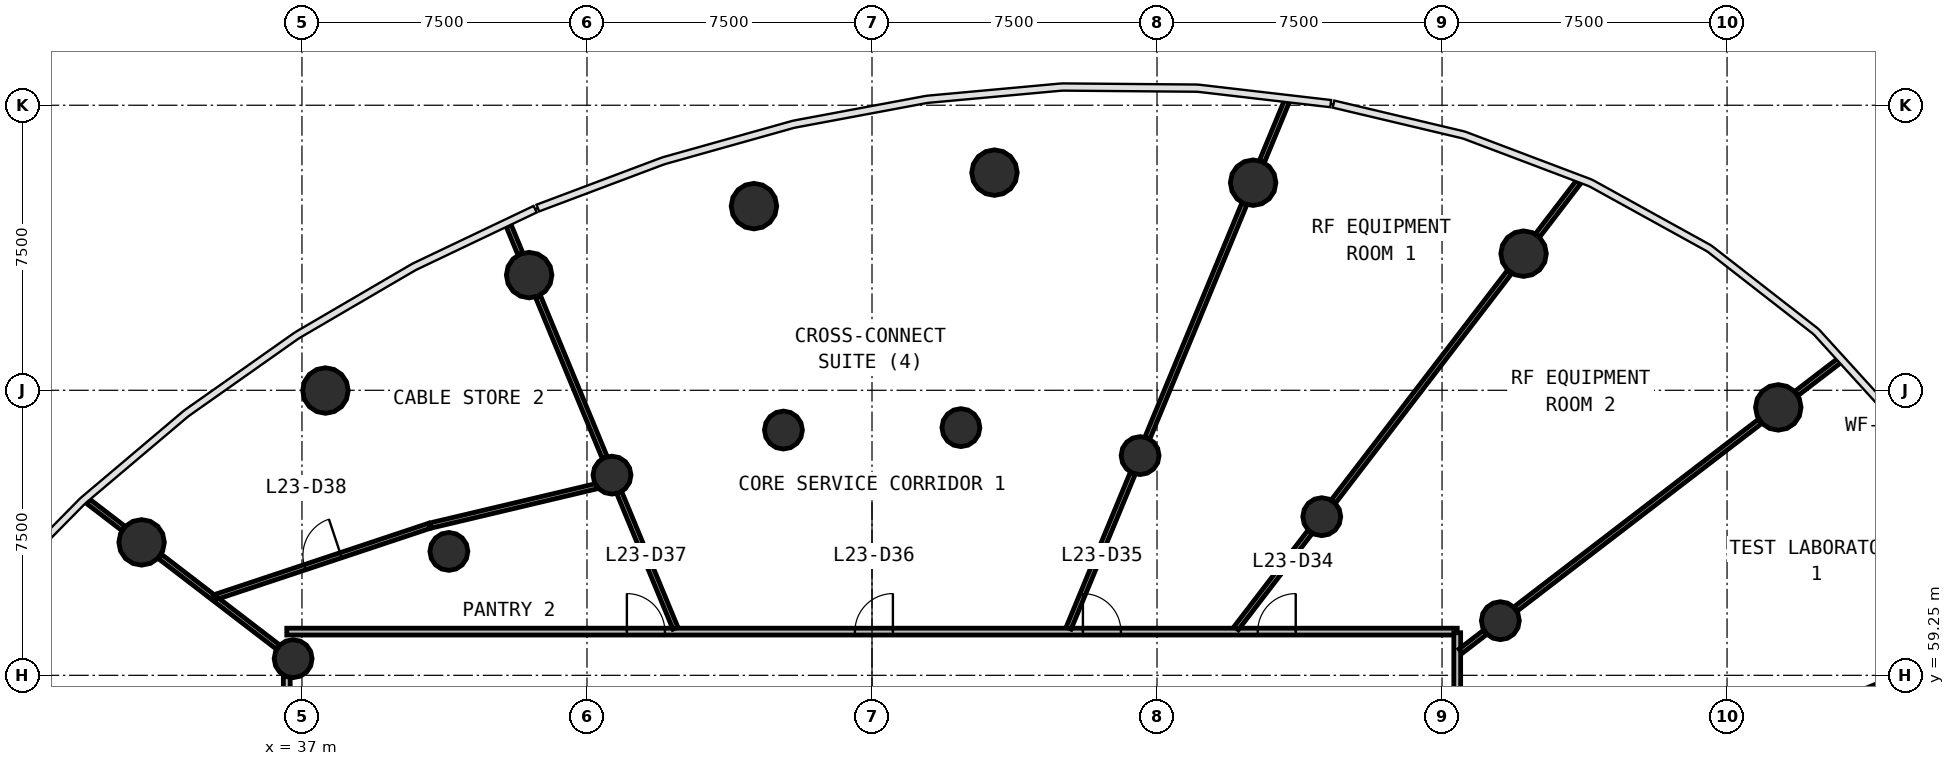
"""IFC4 building model, lengths in metres.
Left out: names, types, materials, properties, quantities, classifications, styles, units other than length and angle.
Written with IfcOpenShell. Run it as: python <this file> out.ifc"""

import sys

from ifc_helpers import new_model, si_unit, direction, frame, frame_2d, origin, origin_2d, place, context, subcontext, project, spatial, rectangle, circle, extrude, source, transform, mapped, element, fill, save


model = new_model("IFC4")
c1 = context("Model", 3, precision=1e-05, world=origin(), true_north=direction((0.0, 1.0)))
c2 = subcontext(c1, "Body", "Model", "MODEL_VIEW")
j1 = project(units=[si_unit("LENGTHUNIT", "METRE"), si_unit("PLANEANGLEUNIT", "RADIAN")], contexts=[c1])
p1 = place(None, origin())
s1 = spatial("IfcSite", under=j1, at=p1, CompositionType="ELEMENT")
p2 = place(p1, origin())
s2 = spatial("IfcBuilding", under=s1, at=p2, CompositionType="ELEMENT")
p3 = place(p2, frame((0.0, 0.0, 100.3)))
s3 = spatial("IfcBuildingStorey", under=s2, at=p3, CompositionType="ELEMENT", Elevation=100.3)
m1 = source(origin(), c2, "Body", "SweptSolid", [
    extrude(circle(Radius=0.6, at=origin_2d()), origin(), (0.0, 0.0, 1.0), 4.1),
])
for number, where, z_axis, x_axis in (
    (1, (75.848, 66.299, 0.0), (0.0, 0.0, 1.0), (1.0, 0.0, 0.0)),
    (2, (69.146, 70.345, 0.0), (0.0, 0.0, 1.0), (1.0, 0.0, 0.0)),
    (3, (62.029, 72.212, 0.0), (0.0, 0.0, 1.0), (1.0, 0.0, 0.0)),
    (4, (55.222, 72.477, 0.0), (0.0, 0.0, 1.0), (1.0, 0.0, 0.0)),
    (5, (48.894, 71.595, 0.0), (0.0, 0.0, 1.0), (1.0, 0.0, 0.0)),
    (6, (42.978, 69.781, 0.0), (0.0, 0.0, 1.0), (1.0, 0.0, 0.0)),
    (7, (37.618, 66.743, 0.0), (0.0, 0.0, 1.0), (1.0, 0.0, 0.0)),
    (8, (32.78, 62.748, 0.0), (0.0, 0.0, 1.0), (1.0, 0.0, 0.0)),
):
    element("IfcColumn", number, at=place(p3, frame(where, z_axis=z_axis, x_axis=x_axis)), inside=s3, PredefinedType="COLUMN", context=c2, shape_type="MappedRepresentation", body=[
        mapped(m1, transform((0.0, 0.0, 0.0), scale=1.0)),
    ])
m2 = source(origin(), c2, "Body", "SweptSolid", [
    extrude(circle(Radius=0.5, at=origin_2d()), origin(), (0.0, 0.0, 1.0), 4.1),
])
for number, where, z_axis, x_axis in (
    (9, (68.535, 60.688, 0.0), (0.0, 0.0, 1.0), (1.0, 0.0, 0.0)),
    (10, (63.835, 63.424, 0.0), (0.0, 0.0, 1.0), (1.0, 0.0, 0.0)),
    (11, (59.055, 65.031, 0.0), (0.0, 0.0, 1.0), (1.0, 0.0, 0.0)),
    (12, (54.339, 65.767, 0.0), (0.0, 0.0, 1.0), (1.0, 0.0, 0.0)),
    (13, (49.669, 65.703, 0.0), (0.0, 0.0, 1.0), (1.0, 0.0, 0.0)),
    (14, (45.158, 64.518, 0.0), (0.0, 0.0, 1.0), (1.0, 0.0, 0.0)),
    (15, (40.866, 62.51, 0.0), (0.0, 0.0, 1.0), (1.0, 0.0, 0.0)),
    (16, (36.768, 59.688, 0.0), (0.0, 0.0, 1.0), (1.0, 0.0, 0.0)),
):
    element("IfcColumn", number, at=place(p3, frame(where, z_axis=z_axis, x_axis=x_axis)), inside=s3, PredefinedType="COLUMN", context=c2, shape_type="MappedRepresentation", body=[
        mapped(m2, transform((0.0, 0.0, 0.0), scale=1.0)),
    ])
p4 = place(p3, frame((36.6, 60.4, 0.0), z_axis=(0.0, 0.0, 1.0), x_axis=(1.0, 0.0, 0.0)))
e17 = element("IfcWall", 17, at=p4, inside=s3, PredefinedType="PARTITIONING", context=c2, shape_type="SweptSolid", body=[
    extrude(rectangle(XDim=30.8, YDim=0.18, at=frame_2d((15.4, 0.0))), origin(), (0.0, 0.0, 1.0), 2.9),
])
p5 = place(p4, frame((25.55, 0.0, 0.0)))
e18 = element("IfcOpeningElement", 18, at=p5, cuts=e17, PredefinedType="OPENING", context=c2, shape_type="SweptSolid", body=[
    extrude(rectangle(XDim=1.0, YDim=2.1, at=frame_2d((0.5, 1.05))), frame((0.0, 0.1, 0.0), z_axis=(0.0, -1.0, 0.0), x_axis=(1.0, 0.0, 0.0)), (0.0, 0.0, 1.0), 0.2),
])
p6 = place(p4, frame((20.95, 0.0, 0.0)))
e19 = element("IfcOpeningElement", 19, at=p6, cuts=e17, PredefinedType="OPENING", context=c2, shape_type="SweptSolid", body=[
    extrude(rectangle(XDim=1.0, YDim=2.1, at=frame_2d((0.5, 1.05))), frame((0.0, 0.1, 0.0), z_axis=(0.0, -1.0, 0.0), x_axis=(1.0, 0.0, 0.0)), (0.0, 0.0, 1.0), 0.2),
])
p7 = place(p4, frame((14.95, 0.0, 0.0)))
e20 = element("IfcOpeningElement", 20, at=p7, cuts=e17, PredefinedType="OPENING", context=c2, shape_type="SweptSolid", body=[
    extrude(rectangle(XDim=1.0, YDim=2.1, at=frame_2d((0.5, 1.05))), frame((0.0, 0.1, 0.0), z_axis=(0.0, -1.0, 0.0), x_axis=(1.0, 0.0, 0.0)), (0.0, 0.0, 1.0), 0.2),
])
p8 = place(p4, frame((8.95, 0.0, 0.0)))
e21 = element("IfcOpeningElement", 21, at=p8, cuts=e17, PredefinedType="OPENING", context=c2, shape_type="SweptSolid", body=[
    extrude(rectangle(XDim=1.0, YDim=2.1, at=frame_2d((0.5, 1.05))), frame((0.0, 0.1, 0.0), z_axis=(0.0, -1.0, 0.0), x_axis=(1.0, 0.0, 0.0)), (0.0, 0.0, 1.0), 0.2),
])
p9 = place(p3, frame((67.4, 60.37, 0.0), z_axis=(0.0, 0.0, 1.0), x_axis=(0.0, -1.0, 0.0)))
e22 = element("IfcWall", 22, at=p9, inside=s3, PredefinedType="PARTITIONING", context=c2, shape_type="SweptSolid", body=[
    extrude(rectangle(XDim=23.583, YDim=0.18, at=frame_2d((11.791, 0.0))), origin(), (0.0, 0.0, 1.0), 2.9),
])
p10 = place(p9, frame((14.732, 0.0, 0.0)))
e23 = element("IfcOpeningElement", 23, at=p10, cuts=e22, PredefinedType="OPENING", context=c2, shape_type="SweptSolid", body=[
    extrude(rectangle(XDim=1.0, YDim=2.1, at=frame_2d((0.5, 1.05))), frame((0.0, 0.1, 0.0), z_axis=(0.0, -1.0, 0.0), x_axis=(1.0, 0.0, 0.0)), (0.0, 0.0, 1.0), 0.2),
])
p11 = place(p9, frame((11.333, 0.0, 0.0)))
e24 = element("IfcOpeningElement", 24, at=p11, cuts=e22, PredefinedType="OPENING", context=c2, shape_type="SweptSolid", body=[
    extrude(rectangle(XDim=1.0, YDim=2.1, at=frame_2d((0.5, 1.05))), frame((0.0, 0.1, 0.0), z_axis=(0.0, -1.0, 0.0), x_axis=(1.0, 0.0, 0.0)), (0.0, 0.0, 1.0), 0.2),
])
p12 = place(p9, frame((4.532, 0.0, 0.0)))
e25 = element("IfcOpeningElement", 25, at=p12, cuts=e22, PredefinedType="OPENING", context=c2, shape_type="SweptSolid", body=[
    extrude(rectangle(XDim=1.0, YDim=2.1, at=frame_2d((0.5, 1.05))), frame((0.0, 0.1, 0.0), z_axis=(0.0, -1.0, 0.0), x_axis=(1.0, 0.0, 0.0)), (0.0, 0.0, 1.0), 0.2),
])
p13 = place(p3, frame((36.6, 35.63, 0.0), z_axis=(0.0, 0.0, 1.0), x_axis=(0.0, 1.0, 0.0)))
e26 = element("IfcWall", 26, at=p13, inside=s3, PredefinedType="PARTITIONING", context=c2, shape_type="SweptSolid", body=[
    extrude(rectangle(XDim=23.583, YDim=0.18, at=frame_2d((11.791, 0.0))), origin(), (0.0, 0.0, 1.0), 2.9),
])
p14 = place(p13, frame((11.333, 0.0, 0.0)))
e27 = element("IfcOpeningElement", 27, at=p14, cuts=e26, PredefinedType="OPENING", context=c2, shape_type="SweptSolid", body=[
    extrude(rectangle(XDim=1.0, YDim=2.1, at=frame_2d((0.5, 1.05))), frame((0.0, 0.1, 0.0), z_axis=(0.0, -1.0, 0.0), x_axis=(1.0, 0.0, 0.0)), (0.0, 0.0, 1.0), 0.2),
])
p15 = place(p13, frame((9.133, 0.0, 0.0)))
e28 = element("IfcOpeningElement", 28, at=p15, cuts=e26, PredefinedType="OPENING", context=c2, shape_type="SweptSolid", body=[
    extrude(rectangle(XDim=1.0, YDim=2.1, at=frame_2d((0.5, 1.05))), frame((0.0, 0.1, 0.0), z_axis=(0.0, -1.0, 0.0), x_axis=(1.0, 0.0, 0.0)), (0.0, 0.0, 1.0), 0.2),
])
p16 = place(p3, frame((68.935, 60.995, 0.0), z_axis=(0.0, 0.0, 1.0), x_axis=(0.793358692504, 0.608754453805, 0.0)))
e29 = element("IfcWall", 29, at=p16, inside=s3, PredefinedType="PARTITIONING", context=c2, shape_type="SweptSolid", body=[
    extrude(rectangle(XDim=8.11, YDim=0.14, at=frame_2d((4.055, 0.0))), origin(), (0.0, 0.0, 1.0), 2.9),
])
p17 = place(p3, frame((64.142, 63.824, 0.0), z_axis=(0.0, 0.0, 1.0), x_axis=(0.608755907151, 0.793357577331, 0.0)))
e30 = element("IfcWall", 30, at=p17, inside=s3, PredefinedType="PARTITIONING", context=c2, shape_type="SweptSolid", body=[
    extrude(rectangle(XDim=7.615, YDim=0.14, at=frame_2d((3.808, 0.0))), origin(), (0.0, 0.0, 1.0), 2.9),
])
p18 = place(p3, frame((59.248, 65.498, 0.0), z_axis=(0.0, 0.0, 1.0), x_axis=(0.382696989205, 0.923873916968, 0.0)))
e31 = element("IfcWall", 31, at=p18, inside=s3, PredefinedType="PARTITIONING", context=c2, shape_type="SweptSolid", body=[
    extrude(rectangle(XDim=6.663, YDim=0.14, at=frame_2d((3.332, 0.0))), origin(), (0.0, 0.0, 1.0), 2.9),
])
p19 = place(p3, frame((34.675, 61.294, 0.0), z_axis=(0.0, 0.0, 1.0), x_axis=(0.948817917671, 0.315823620247, 0.0)))
e32 = element("IfcWall", 32, at=p19, inside=s3, PredefinedType="PARTITIONING", context=c2, shape_type="SweptSolid", body=[
    extrude(rectangle(XDim=5.981, YDim=0.14, at=frame_2d((2.99, 0.0))), origin(), (0.0, 0.0, 1.0), 2.9),
])
p20 = place(p19, frame((2.531, 0.0, 0.0)))
e33 = element("IfcOpeningElement", 33, at=p20, cuts=e32, PredefinedType="OPENING", context=c2, shape_type="SweptSolid", body=[
    extrude(rectangle(XDim=1.0, YDim=2.1, at=frame_2d((0.5, 1.05))), frame((0.0, 0.08, 0.0), z_axis=(0.0, -1.0, 0.0), x_axis=(1.0, 0.0, 0.0)), (0.0, 0.0, 1.0), 0.16),
])
p21 = place(p3, frame((74.998, 57.526, 0.0), z_axis=(0.0, 0.0, 1.0), x_axis=(0.923875965801, 0.382692043051, 0.0)))
e34 = element("IfcWall", 34, at=p21, inside=s3, PredefinedType="PARTITIONING", context=c2, shape_type="SweptSolid", body=[
    extrude(rectangle(XDim=5.302, YDim=0.14, at=frame_2d((2.651, 0.0))), origin(), (0.0, 0.0, 1.0), 2.9),
])
p22 = place(p3, frame((44.965, 64.984, 0.0), z_axis=(0.0, 0.0, 1.0), x_axis=(-0.382705930348, 0.923870213221, 0.0)))
e35 = element("IfcWall", 35, at=p22, inside=s3, PredefinedType="PARTITIONING", context=c2, shape_type="SweptSolid", body=[
    extrude(rectangle(XDim=4.587, YDim=0.14, at=frame_2d((2.293, 0.0))), origin(), (0.0, 0.0, 1.0), 2.9),
])
p23 = place(p3, frame((44.747, 64.226, 0.0), z_axis=(0.0, 0.0, 1.0), x_axis=(-0.973038547424, -0.230642548604, 0.0)))
e36 = element("IfcWall", 36, at=p23, inside=s3, PredefinedType="PARTITIONING", context=c2, shape_type="SweptSolid", body=[
    extrude(rectangle(XDim=4.489, YDim=0.14, at=frame_2d((2.245, 0.0))), origin(), (0.0, 0.0, 1.0), 2.9),
])
p24 = place(p3, frame((57.174, 60.49, 0.0), z_axis=(0.0, 0.0, 1.0), x_axis=(0.382672831764, 0.923883923353, 0.0)))
e37 = element("IfcWall", 37, at=p24, inside=s3, PredefinedType="PARTITIONING", context=c2, shape_type="SweptSolid", body=[
    extrude(rectangle(XDim=4.41, YDim=0.14, at=frame_2d((2.205, 0.0))), origin(), (0.0, 0.0, 1.0), 2.9),
])
p25 = place(p3, frame((46.826, 60.49, 0.0), z_axis=(0.0, 0.0, 1.0), x_axis=(-0.382644558062, 0.923895633817, 0.0)))
e38 = element("IfcWall", 38, at=p25, inside=s3, PredefinedType="PARTITIONING", context=c2, shape_type="SweptSolid", body=[
    extrude(rectangle(XDim=3.854, YDim=0.14, at=frame_2d((1.927, 0.0))), origin(), (0.0, 0.0, 1.0), 2.9),
])
p26 = place(p3, frame((61.584, 60.49, 0.0), z_axis=(0.0, 0.0, 1.0), x_axis=(0.60874605662, 0.793365135703, 0.0)))
e39 = element("IfcWall", 39, at=p26, inside=s3, PredefinedType="PARTITIONING", context=c2, shape_type="SweptSolid", body=[
    extrude(rectangle(XDim=3.194, YDim=0.14, at=frame_2d((1.597, 0.0))), origin(), (0.0, 0.0, 1.0), 2.9),
])
p27 = place(p3, frame((36.367, 59.995, 0.0), z_axis=(0.0, 0.0, 1.0), x_axis=(-0.793389614633, 0.608714152449, 0.0)))
e40 = element("IfcWall", 40, at=p27, inside=s3, PredefinedType="PARTITIONING", context=c2, shape_type="SweptSolid", body=[
    extrude(rectangle(XDim=2.049, YDim=0.14, at=frame_2d((1.024, 0.0))), origin(), (0.0, 0.0, 1.0), 2.9),
])
p28 = place(p3, frame((34.651, 61.312, 0.0), z_axis=(0.0, 0.0, 1.0), x_axis=(-0.793368751306, 0.608741344456, 0.0)))
e41 = element("IfcWall", 41, at=p28, inside=s3, PredefinedType="PARTITIONING", context=c2, shape_type="SweptSolid", body=[
    extrude(rectangle(XDim=1.753, YDim=0.14, at=frame_2d((0.877, 0.0))), origin(), (0.0, 0.0, 1.0), 2.9),
])
p29 = place(p3, frame((69.514, 70.824, 0.0), z_axis=(0.0, 0.0, 1.0), x_axis=(0.608816765526, 0.793310876022, 0.0)))
e42 = element("IfcWall", 42, at=p29, inside=s3, PredefinedType="PARTITIONING", context=c2, shape_type="SweptSolid", body=[
    extrude(rectangle(XDim=1.769, YDim=0.14, at=frame_2d((0.885, 0.0))), origin(), (0.0, 0.0, 1.0), 2.9),
])
p30 = place(p3, frame((62.26, 72.771, 0.0), z_axis=(0.0, 0.0, 1.0), x_axis=(0.382769756697, 0.923843771077, 0.0)))
e43 = element("IfcWall", 43, at=p30, inside=s3, PredefinedType="PARTITIONING", context=c2, shape_type="SweptSolid", body=[
    extrude(rectangle(XDim=1.719, YDim=0.14, at=frame_2d((0.86, 0.0))), origin(), (0.0, 0.0, 1.0), 2.9),
])
p31 = place(p3, frame((76.328, 66.667, 0.0), z_axis=(0.0, 0.0, 1.0), x_axis=(0.793384012646, 0.608721453932, 0.0)))
e44 = element("IfcWall", 44, at=p31, inside=s3, PredefinedType="PARTITIONING", context=c2, shape_type="SweptSolid", body=[
    extrude(rectangle(XDim=1.432, YDim=0.14, at=frame_2d((0.716, 0.0))), origin(), (0.0, 0.0, 1.0), 2.9),
])
p32 = place(p3, frame((32.301, 63.116, 0.0), z_axis=(0.0, 0.0, 1.0), x_axis=(-0.793332880396, 0.608788091935, 0.0)))
e45 = element("IfcWall", 45, at=p32, inside=s3, PredefinedType="PARTITIONING", context=c2, shape_type="SweptSolid", body=[
    extrude(rectangle(XDim=1.164, YDim=0.14, at=frame_2d((0.582, 0.0))), origin(), (0.0, 0.0, 1.0), 2.9),
])
p33 = place(p3, frame((67.49, 59.886, 0.0), z_axis=(0.0, 0.0, 1.0), x_axis=(0.793316076519, 0.608809989025, 0.0)))
e46 = element("IfcWall", 46, at=p33, inside=s3, PredefinedType="PARTITIONING", context=c2, shape_type="SweptSolid", body=[
    extrude(rectangle(XDim=0.812, YDim=0.14, at=frame_2d((0.406, 0.0))), origin(), (0.0, 0.0, 1.0), 2.9),
])
p34 = place(p3, frame((42.747, 70.34, 0.0), z_axis=(0.0, 0.0, 1.0), x_axis=(-0.382520140646, 0.923947153251, 0.0)))
e47 = element("IfcWall", 47, at=p34, inside=s3, PredefinedType="PARTITIONING", context=c2, shape_type="SweptSolid", body=[
    extrude(rectangle(XDim=0.811, YDim=0.14, at=frame_2d((0.406, 0.0))), origin(), (0.0, 0.0, 1.0), 2.9),
])
m3 = source(origin(), c2, "Body", "SweptSolid", [
    extrude(rectangle(XDim=1.0, YDim=2.1, at=frame_2d((0.5, 1.05))), frame((0.0, 0.025, 0.0), z_axis=(0.0, -1.0, 0.0), x_axis=(1.0, 0.0, 0.0)), (0.0, 0.0, 1.0), 0.05),
])
p35 = place(p5, origin())
e48 = element("IfcDoor", 48, at=p35, inside=s3, OperationType="SINGLE_SWING_RIGHT", PredefinedType="DOOR", context=c2, shape_type="MappedRepresentation", body=[
    mapped(m3, transform((0.0, 0.0, 0.0), scale=1.0)),
])
fill(e18, e48)
p36 = place(p6, origin())
e49 = element("IfcDoor", 49, at=p36, inside=s3, OperationType="SINGLE_SWING_LEFT", PredefinedType="DOOR", context=c2, shape_type="MappedRepresentation", body=[
    mapped(m3, transform((0.0, 0.0, 0.0), scale=1.0)),
])
fill(e19, e49)
p37 = place(p7, origin())
e50 = element("IfcDoor", 50, at=p37, inside=s3, OperationType="SINGLE_SWING_RIGHT", PredefinedType="DOOR", context=c2, shape_type="MappedRepresentation", body=[
    mapped(m3, transform((0.0, 0.0, 0.0), scale=1.0)),
])
fill(e20, e50)
p38 = place(p8, origin())
e51 = element("IfcDoor", 51, at=p38, inside=s3, OperationType="SINGLE_SWING_LEFT", PredefinedType="DOOR", context=c2, shape_type="MappedRepresentation", body=[
    mapped(m3, transform((0.0, 0.0, 0.0), scale=1.0)),
])
fill(e21, e51)
p39 = place(p20, origin())
e52 = element("IfcDoor", 52, at=p39, inside=s3, OperationType="SINGLE_SWING_RIGHT", PredefinedType="DOOR", context=c2, shape_type="MappedRepresentation", body=[
    mapped(m3, transform((0.0, 0.0, 0.0), scale=1.0)),
])
fill(e33, e52)
save(model, sys.argv[1])
